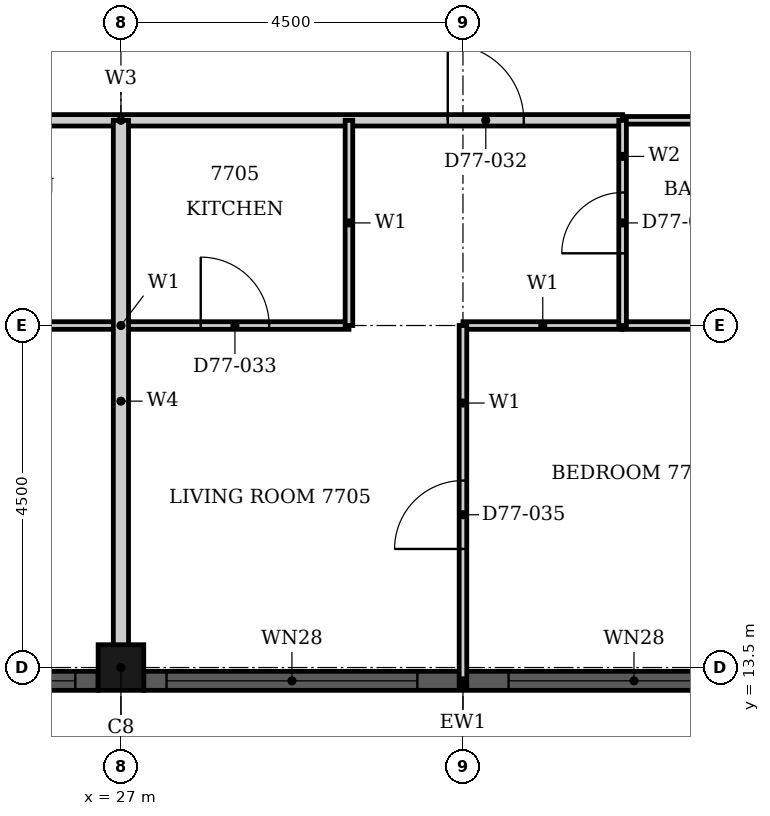
"""IFC4 building model, lengths in metres.
Left out: names, types, materials, properties, quantities, classifications, styles, units other than length and angle.
Written with IfcOpenShell. Run it as: python <this file> out.ifc"""

import sys

from ifc_helpers import new_model, si_unit, direction, frame, frame_2d, origin, origin_2d, place, context, subcontext, project, spatial, rectangle, hollow_rectangle, extrude, element, fill, save


model = new_model("IFC4")
c1 = context("Model", 3, precision=1e-05, world=origin(), true_north=direction((0.0, 1.0)))
c2 = subcontext(c1, "Body", "Model", "MODEL_VIEW")
j1 = project(units=[si_unit("LENGTHUNIT", "METRE"), si_unit("PLANEANGLEUNIT", "RADIAN")], contexts=[c1])
p1 = place(None, origin())
s1 = spatial("IfcSite", under=j1, at=p1, CompositionType="ELEMENT")
p2 = place(p1, origin())
s2 = spatial("IfcBuilding", under=s1, at=p2, CompositionType="ELEMENT")
p3 = place(p2, frame((0.0, 0.0, 301.9)))
s3 = spatial("IfcBuildingStorey", under=s2, at=p3, CompositionType="ELEMENT", Elevation=301.9)
p4 = place(p3, frame((27.0, 13.5, 0.0), z_axis=(0.0, 0.0, 1.0), x_axis=(1.0, 0.0, 0.0)))
e1 = element("IfcColumn", 1, at=p4, inside=s3, PredefinedType="COLUMN", context=c2, shape_type="SweptSolid", body=[
    extrude(hollow_rectangle(XDim=0.6, YDim=0.6, WallThickness=0.02, at=origin_2d()), origin(), (0.0, 0.0, 1.0), 3.7),
])
p5 = place(p3, frame((18.3, 13.325, 0.0), z_axis=(0.0, 0.0, 1.0), x_axis=(1.0, 0.0, 0.0)))
e2 = element("IfcWall", 2, at=p5, inside=s3, PredefinedType="SOLIDWALL", context=c2, shape_type="SweptSolid", body=[
    extrude(rectangle(XDim=8.4, YDim=0.25, at=frame_2d((4.2, 0.0))), origin(), (0.0, 0.0, 1.0), 3.7),
])
p6 = place(p5, frame((0.3, 0.0, 0.45)))
e3 = element("IfcOpeningElement", 3, at=p6, cuts=e2, PredefinedType="OPENING", context=c2, shape_type="SweptSolid", body=[
    extrude(rectangle(XDim=3.3, YDim=1.8, at=frame_2d((1.65, 0.9))), frame((0.0, 0.135, 0.0), z_axis=(0.0, -1.0, 0.0), x_axis=(1.0, 0.0, 0.0)), (0.0, 0.0, 1.0), 0.27),
])
p7 = place(p5, frame((4.8, 0.0, 0.45)))
e4 = element("IfcOpeningElement", 4, at=p7, cuts=e2, PredefinedType="OPENING", context=c2, shape_type="SweptSolid", body=[
    extrude(rectangle(XDim=3.3, YDim=1.8, at=frame_2d((1.65, 0.9))), frame((0.0, 0.135, 0.0), z_axis=(0.0, -1.0, 0.0), x_axis=(1.0, 0.0, 0.0)), (0.0, 0.0, 1.0), 0.27),
])
p8 = place(p3, frame((27.3, 13.325, 0.0), z_axis=(0.0, 0.0, 1.0), x_axis=(1.0, 0.0, 0.0)))
e5 = element("IfcWall", 5, at=p8, inside=s3, PredefinedType="SOLIDWALL", context=c2, shape_type="SweptSolid", body=[
    extrude(rectangle(XDim=8.4, YDim=0.25, at=frame_2d((4.2, 0.0))), origin(), (0.0, 0.0, 1.0), 3.7),
])
p9 = place(p8, frame((0.3, 0.0, 0.45)))
e6 = element("IfcOpeningElement", 6, at=p9, cuts=e5, PredefinedType="OPENING", context=c2, shape_type="SweptSolid", body=[
    extrude(rectangle(XDim=3.3, YDim=1.8, at=frame_2d((1.65, 0.9))), frame((0.0, 0.135, 0.0), z_axis=(0.0, -1.0, 0.0), x_axis=(1.0, 0.0, 0.0)), (0.0, 0.0, 1.0), 0.27),
])
p10 = place(p8, frame((4.8, 0.0, 0.45)))
e7 = element("IfcOpeningElement", 7, at=p10, cuts=e5, PredefinedType="OPENING", context=c2, shape_type="SweptSolid", body=[
    extrude(rectangle(XDim=3.3, YDim=1.8, at=frame_2d((1.65, 0.9))), frame((0.0, 0.135, 0.0), z_axis=(0.0, -1.0, 0.0), x_axis=(1.0, 0.0, 0.0)), (0.0, 0.0, 1.0), 0.27),
])
p11 = place(p3, frame((20.4, 20.7, 0.0), z_axis=(0.0, 0.0, 1.0), x_axis=(1.0, 0.0, 0.0)))
e8 = element("IfcWall", 8, at=p11, inside=s3, PredefinedType="PARTITIONING", context=c2, shape_type="SweptSolid", body=[
    extrude(rectangle(XDim=13.2, YDim=0.15, at=frame_2d((6.6, 0.0))), origin(), (0.0, 0.0, 1.0), 3.2),
])
p12 = place(p11, frame((1.3, 0.0, 0.0)))
e9 = element("IfcOpeningElement", 9, at=p12, cuts=e8, PredefinedType="OPENING", context=c2, shape_type="SweptSolid", body=[
    extrude(rectangle(XDim=1.0, YDim=2.2, at=frame_2d((0.5, 1.1))), frame((0.0, 0.085, 0.0), z_axis=(0.0, -1.0, 0.0), x_axis=(1.0, 0.0, 0.0)), (0.0, 0.0, 1.0), 0.17),
])
p13 = place(p11, frame((10.9, 0.0, 0.0)))
e10 = element("IfcOpeningElement", 10, at=p13, cuts=e8, PredefinedType="OPENING", context=c2, shape_type="SweptSolid", body=[
    extrude(rectangle(XDim=1.0, YDim=2.2, at=frame_2d((0.5, 1.1))), frame((0.0, 0.085, 0.0), z_axis=(0.0, -1.0, 0.0), x_axis=(1.0, 0.0, 0.0)), (0.0, 0.0, 1.0), 0.17),
])
p14 = place(p3, frame((24.0, 18.0, 0.0), z_axis=(0.0, 0.0, 1.0), x_axis=(1.0, 0.0, 0.0)))
e11 = element("IfcWall", 11, at=p14, inside=s3, PredefinedType="PARTITIONING", context=c2, shape_type="SweptSolid", body=[
    extrude(rectangle(XDim=6.0, YDim=0.1, at=frame_2d((3.0, 0.0))), origin(), (0.0, 0.0, 1.0), 3.2),
])
p15 = place(p14, frame((1.05, 0.0, 0.0)))
e12 = element("IfcOpeningElement", 12, at=p15, cuts=e11, PredefinedType="OPENING", context=c2, shape_type="SweptSolid", body=[
    extrude(rectangle(XDim=0.9, YDim=2.1, at=frame_2d((0.45, 1.05))), frame((0.0, 0.06, 0.0), z_axis=(0.0, -1.0, 0.0), x_axis=(1.0, 0.0, 0.0)), (0.0, 0.0, 1.0), 0.12),
])
p16 = place(p14, frame((4.05, 0.0, 0.0)))
e13 = element("IfcOpeningElement", 13, at=p16, cuts=e11, PredefinedType="OPENING", context=c2, shape_type="SweptSolid", body=[
    extrude(rectangle(XDim=0.9, YDim=2.1, at=frame_2d((0.45, 1.05))), frame((0.0, 0.06, 0.0), z_axis=(0.0, -1.0, 0.0), x_axis=(1.0, 0.0, 0.0)), (0.0, 0.0, 1.0), 0.12),
])
p17 = place(p3, frame((31.5, 18.0, 0.0), z_axis=(0.0, 0.0, 1.0), x_axis=(1.0, 0.0, 0.0)))
e14 = element("IfcWall", 14, at=p17, inside=s3, PredefinedType="PARTITIONING", context=c2, shape_type="SweptSolid", body=[
    extrude(rectangle(XDim=2.1, YDim=0.1, at=frame_2d((1.05, 0.0))), origin(), (0.0, 0.0, 1.0), 3.2),
])
p18 = place(p3, frame((30.0, 18.0, 0.0), z_axis=(0.0, 0.0, 1.0), x_axis=(0.0, 1.0, 0.0)))
e15 = element("IfcWall", 15, at=p18, inside=s3, PredefinedType="PARTITIONING", context=c2, shape_type="SweptSolid", body=[
    extrude(rectangle(XDim=2.7, YDim=0.1, at=frame_2d((1.35, 0.0))), origin(), (0.0, 0.0, 1.0), 3.2),
])
p19 = place(p3, frame((31.5, 13.26, 0.0), z_axis=(0.0, 0.0, 1.0), x_axis=(0.0, 1.0, 0.0)))
e16 = element("IfcWall", 16, at=p19, inside=s3, PredefinedType="PARTITIONING", context=c2, shape_type="SweptSolid", body=[
    extrude(rectangle(XDim=4.74, YDim=0.1, at=frame_2d((2.37, 0.0))), origin(), (0.0, 0.0, 1.0), 3.2),
])
p20 = place(p19, frame((1.8, 0.0, 0.0)))
e17 = element("IfcOpeningElement", 17, at=p20, cuts=e16, PredefinedType="OPENING", context=c2, shape_type="SweptSolid", body=[
    extrude(rectangle(XDim=0.9, YDim=2.1, at=frame_2d((0.45, 1.05))), frame((0.0, 0.06, 0.0), z_axis=(0.0, -1.0, 0.0), x_axis=(1.0, 0.0, 0.0)), (0.0, 0.0, 1.0), 0.12),
])
p21 = place(p3, frame((27.0, 13.31, 0.0), z_axis=(0.0, 0.0, 1.0), x_axis=(0.0, 1.0, 0.0)))
e18 = element("IfcWall", 18, at=p21, inside=s3, PredefinedType="PARTITIONING", context=c2, shape_type="SweptSolid", body=[
    extrude(rectangle(XDim=7.39, YDim=0.2, at=frame_2d((3.695, 0.0))), origin(), (0.0, 0.0, 1.0), 3.2),
])
for number, where, z_axis, x_axis in (
    (19, (33.6, 18.0, 0.0), (0.0, 0.0, 1.0), (1.0, 0.0, 0.0)),
    (20, (33.6, 20.7, 0.0), (0.0, 0.0, 1.0), (1.0, 0.0, 0.0)),
):
    element("IfcWall", number, at=place(p3, frame(where, z_axis=z_axis, x_axis=x_axis)), inside=s3, PredefinedType="PARTITIONING", context=c2, shape_type="SweptSolid", body=[
        extrude(rectangle(XDim=4.8, YDim=0.1, at=frame_2d((2.4, 0.0))), origin(), (0.0, 0.0, 1.0), 3.2),
    ])
p22 = place(p3, frame((33.6, 18.0, 0.0), z_axis=(0.0, 0.0, 1.0), x_axis=(0.0, 1.0, 0.0)))
e21 = element("IfcWall", 21, at=p22, inside=s3, PredefinedType="PARTITIONING", context=c2, shape_type="SweptSolid", body=[
    extrude(rectangle(XDim=2.7, YDim=0.1, at=frame_2d((1.35, 0.0))), origin(), (0.0, 0.0, 1.0), 3.2),
])
p23 = place(p22, frame((0.95, 0.0, 0.0)))
e22 = element("IfcOpeningElement", 22, at=p23, cuts=e21, PredefinedType="OPENING", context=c2, shape_type="SweptSolid", body=[
    extrude(rectangle(XDim=0.8, YDim=2.1, at=frame_2d((0.4, 1.05))), frame((0.0, 0.06, 0.0), z_axis=(0.0, -1.0, 0.0), x_axis=(1.0, 0.0, 0.0)), (0.0, 0.0, 1.0), 0.12),
])
p24 = place(p7, origin())
e23 = element("IfcWindow", 23, at=p24, inside=s3, PartitioningType="SINGLE_PANEL", PredefinedType="WINDOW", context=c2, shape_type="SweptSolid", body=[
    extrude(rectangle(XDim=3.3, YDim=1.8, at=frame_2d((1.65, 0.9))), frame((0.0, 0.03, 0.0), z_axis=(0.0, -1.0, 0.0), x_axis=(1.0, 0.0, 0.0)), (0.0, 0.0, 1.0), 0.06),
])
fill(e4, e23)
p25 = place(p9, origin())
e24 = element("IfcWindow", 24, at=p25, inside=s3, PartitioningType="SINGLE_PANEL", PredefinedType="WINDOW", context=c2, shape_type="SweptSolid", body=[
    extrude(rectangle(XDim=3.3, YDim=1.8, at=frame_2d((1.65, 0.9))), frame((0.0, 0.03, 0.0), z_axis=(0.0, -1.0, 0.0), x_axis=(1.0, 0.0, 0.0)), (0.0, 0.0, 1.0), 0.06),
])
fill(e6, e24)
p26 = place(p10, origin())
e25 = element("IfcWindow", 25, at=p26, inside=s3, PartitioningType="SINGLE_PANEL", PredefinedType="WINDOW", context=c2, shape_type="SweptSolid", body=[
    extrude(rectangle(XDim=3.3, YDim=1.8, at=frame_2d((1.65, 0.9))), frame((0.0, 0.03, 0.0), z_axis=(0.0, -1.0, 0.0), x_axis=(1.0, 0.0, 0.0)), (0.0, 0.0, 1.0), 0.06),
])
fill(e7, e25)
p27 = place(p13, origin())
e26 = element("IfcDoor", 26, at=p27, inside=s3, OperationType="SINGLE_SWING_RIGHT", PredefinedType="DOOR", context=c2, shape_type="SweptSolid", body=[
    extrude(rectangle(XDim=1.0, YDim=2.2, at=frame_2d((0.5, 1.1))), frame((0.0, 0.025, 0.0), z_axis=(0.0, -1.0, 0.0), x_axis=(1.0, 0.0, 0.0)), (0.0, 0.0, 1.0), 0.05),
])
fill(e10, e26)
p28 = place(p16, origin())
e27 = element("IfcDoor", 27, at=p28, inside=s3, OperationType="SINGLE_SWING_LEFT", PredefinedType="DOOR", context=c2, shape_type="SweptSolid", body=[
    extrude(rectangle(XDim=0.9, YDim=2.1, at=frame_2d((0.45, 1.05))), frame((0.0, 0.025, 0.0), z_axis=(0.0, -1.0, 0.0), x_axis=(1.0, 0.0, 0.0)), (0.0, 0.0, 1.0), 0.05),
])
fill(e13, e27)
p29 = place(p23, origin())
e28 = element("IfcDoor", 28, at=p29, inside=s3, OperationType="SINGLE_SWING_RIGHT", PredefinedType="DOOR", context=c2, shape_type="SweptSolid", body=[
    extrude(rectangle(XDim=0.8, YDim=2.1, at=frame_2d((0.4, 1.05))), frame((0.0, 0.025, 0.0), z_axis=(0.0, -1.0, 0.0), x_axis=(1.0, 0.0, 0.0)), (0.0, 0.0, 1.0), 0.05),
])
fill(e22, e28)
p30 = place(p20, origin())
e29 = element("IfcDoor", 29, at=p30, inside=s3, OperationType="SINGLE_SWING_LEFT", PredefinedType="DOOR", context=c2, shape_type="SweptSolid", body=[
    extrude(rectangle(XDim=0.9, YDim=2.1, at=frame_2d((0.45, 1.05))), frame((0.0, 0.025, 0.0), z_axis=(0.0, -1.0, 0.0), x_axis=(1.0, 0.0, 0.0)), (0.0, 0.0, 1.0), 0.05),
])
fill(e17, e29)
save(model, sys.argv[1])
